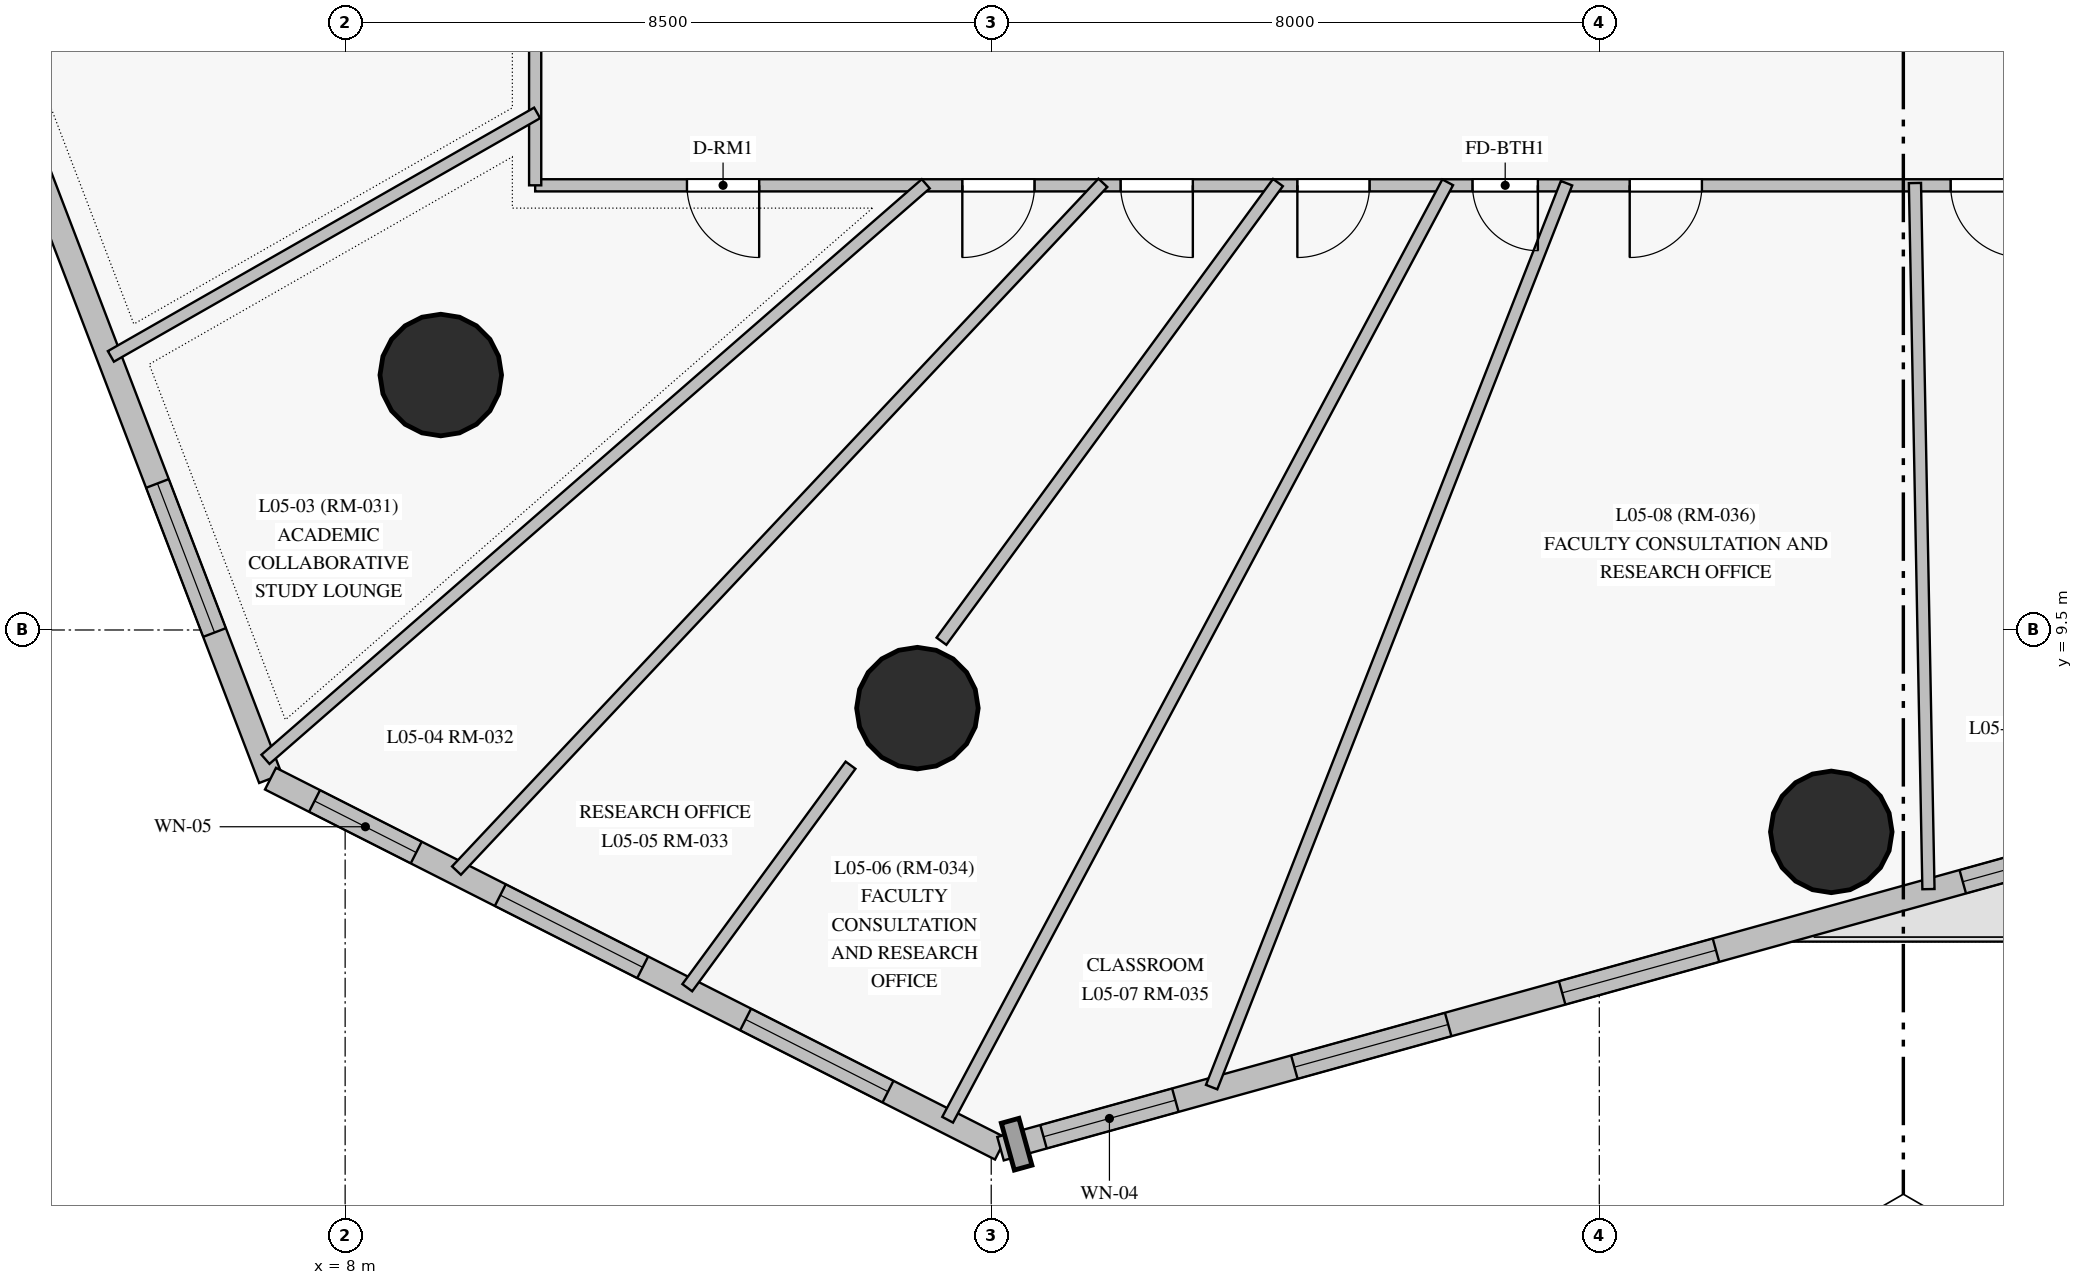
"""IFC4 building model, lengths in metres.
Left out: names, types, materials, properties, quantities, classifications, styles, units other than length and angle.
Written with IfcOpenShell. Run it as: python <this file> out.ifc"""

import sys

from ifc_helpers import new_model, si_unit, direction, frame, frame_2d, origin, origin_with_axes, origin_2d, place, context, subcontext, project, spatial, rectangle, circle, extrude, source, transform, mapped, element, fill, save


model = new_model("IFC4")
c1 = context("Model", 3, precision=1e-05, world=origin(), true_north=direction((0.0, 1.0)))
c2 = subcontext(c1, "Body", "Model", "MODEL_VIEW")
j1 = project(units=[si_unit("LENGTHUNIT", "METRE"), si_unit("PLANEANGLEUNIT", "RADIAN")], contexts=[c1])
p1 = place(None, origin())
s1 = spatial("IfcSite", under=j1, at=p1, CompositionType="ELEMENT")
p2 = place(p1, origin())
s2 = spatial("IfcBuilding", under=s1, at=p2, CompositionType="ELEMENT")
p3 = place(p2, frame((0.0, 0.0, 22.5)))
s3 = spatial("IfcBuildingStorey", under=s2, at=p3, CompositionType="ELEMENT", Elevation=22.5)
m1 = source(origin_with_axes(), c2, "Body", "SweptSolid", [
    extrude(circle(Radius=0.8, at=origin_2d()), origin(), (0.0, 0.0, 1.0), 4.0),
])
for number, where, z_axis, x_axis in (
    (1, (9.258, 12.854, 0.0), (0.0, 0.0, 1.0), (1.0, 0.0, 0.0)),
    (2, (15.529, 8.472, 0.0), (0.0, 0.0, 1.0), (1.0, 0.0, 0.0)),
    (3, (27.552, 6.844, 0.0), (0.0, 0.0, 1.0), (1.0, 0.0, 0.0)),
):
    element("IfcColumn", number, at=place(p3, frame(where, z_axis=z_axis, x_axis=x_axis)), inside=s3, PredefinedType="COLUMN", context=c2, shape_type="MappedRepresentation", body=[
        mapped(m1, transform((0.0, 0.0, 0.0), scale=1.0)),
    ])
p4 = place(p3, frame((2.229, 20.05, 0.0), z_axis=(0.0, 0.0, 1.0), x_axis=(0.357658091535, -0.933852605907, 0.0)))
e4 = element("IfcWall", 4, at=p4, inside=s3, PredefinedType="SOLIDWALL", context=c2, shape_type="SweptSolid", body=[
    extrude(rectangle(XDim=13.391, YDim=0.32, at=frame_2d((6.696, 0.0))), origin(), (0.0, 0.0, 1.0), 3.75),
])
p5 = place(p4, frame((2.704, 0.0, 0.85)))
e5 = element("IfcOpeningElement", 5, at=p5, cuts=e4, PredefinedType="OPENING", context=c2, shape_type="SweptSolid", body=[
    extrude(rectangle(XDim=2.1, YDim=1.95, at=frame_2d((1.05, 0.975))), frame((0.0, 0.17, 0.0), z_axis=(0.0, -1.0, 0.0), x_axis=(1.0, 0.0, 0.0)), (0.0, 0.0, 1.0), 0.34),
])
p6 = place(p4, frame((9.233, 0.0, 0.85)))
e6 = element("IfcOpeningElement", 6, at=p6, cuts=e4, PredefinedType="OPENING", context=c2, shape_type="SweptSolid", body=[
    extrude(rectangle(XDim=2.1, YDim=1.95, at=frame_2d((1.05, 0.975))), frame((0.0, 0.17, 0.0), z_axis=(0.0, -1.0, 0.0), x_axis=(1.0, 0.0, 0.0)), (0.0, 0.0, 1.0), 0.34),
])
p7 = place(p3, frame((7.018, 7.544, 0.0), z_axis=(0.0, 0.0, 1.0), x_axis=(0.891960439123, -0.452113453726, 0.0)))
e7 = element("IfcWall", 7, at=p7, inside=s3, PredefinedType="SOLIDWALL", context=c2, shape_type="SweptSolid", body=[
    extrude(rectangle(XDim=10.768, YDim=0.32, at=frame_2d((5.384, 0.0))), origin(), (0.0, 0.0, 1.0), 3.75),
])
p8 = place(p7, frame((0.649, 0.0, 0.85)))
e8 = element("IfcOpeningElement", 8, at=p8, cuts=e7, PredefinedType="OPENING", context=c2, shape_type="SweptSolid", body=[
    extrude(rectangle(XDim=1.5, YDim=1.85, at=frame_2d((0.75, 0.925))), frame((0.0, 0.17, 0.0), z_axis=(0.0, -1.0, 0.0), x_axis=(1.0, 0.0, 0.0)), (0.0, 0.0, 1.0), 0.34),
])
p9 = place(p7, frame((3.389, 0.0, 0.85)))
e9 = element("IfcOpeningElement", 9, at=p9, cuts=e7, PredefinedType="OPENING", context=c2, shape_type="SweptSolid", body=[
    extrude(rectangle(XDim=2.1, YDim=1.95, at=frame_2d((1.05, 0.975))), frame((0.0, 0.17, 0.0), z_axis=(0.0, -1.0, 0.0), x_axis=(1.0, 0.0, 0.0)), (0.0, 0.0, 1.0), 0.34),
])
p10 = place(p7, frame((7.008, 0.0, 0.85)))
e10 = element("IfcOpeningElement", 10, at=p10, cuts=e7, PredefinedType="OPENING", context=c2, shape_type="SweptSolid", body=[
    extrude(rectangle(XDim=2.1, YDim=1.95, at=frame_2d((1.05, 0.975))), frame((0.0, 0.17, 0.0), z_axis=(0.0, -1.0, 0.0), x_axis=(1.0, 0.0, 0.0)), (0.0, 0.0, 1.0), 0.34),
])
p11 = place(p3, frame((16.622, 2.676, 0.0), z_axis=(0.0, 0.0, 1.0), x_axis=(0.963606446226, 0.267324927367, 0.0)))
e11 = element("IfcWall", 11, at=p11, inside=s3, PredefinedType="SOLIDWALL", context=c2, shape_type="SweptSolid", body=[
    extrude(rectangle(XDim=16.188, YDim=0.32, at=frame_2d((8.094, 0.0))), origin(), (0.0, 0.0, 1.0), 3.75),
])
p12 = place(p11, frame((0.587, 0.0, 0.85)))
e12 = element("IfcOpeningElement", 12, at=p12, cuts=e11, PredefinedType="OPENING", context=c2, shape_type="SweptSolid", body=[
    extrude(rectangle(XDim=1.8, YDim=1.85, at=frame_2d((0.9, 0.925))), frame((0.0, 0.17, 0.0), z_axis=(0.0, -1.0, 0.0), x_axis=(1.0, 0.0, 0.0)), (0.0, 0.0, 1.0), 0.34),
])
p13 = place(p11, frame((4.012, 0.0, 0.85)))
e13 = element("IfcOpeningElement", 13, at=p13, cuts=e11, PredefinedType="OPENING", context=c2, shape_type="SweptSolid", body=[
    extrude(rectangle(XDim=2.1, YDim=1.95, at=frame_2d((1.05, 0.975))), frame((0.0, 0.17, 0.0), z_axis=(0.0, -1.0, 0.0), x_axis=(1.0, 0.0, 0.0)), (0.0, 0.0, 1.0), 0.34),
])
p14 = place(p11, frame((7.668, 0.0, 0.85)))
e14 = element("IfcOpeningElement", 14, at=p14, cuts=e11, PredefinedType="OPENING", context=c2, shape_type="SweptSolid", body=[
    extrude(rectangle(XDim=2.1, YDim=1.95, at=frame_2d((1.05, 0.975))), frame((0.0, 0.17, 0.0), z_axis=(0.0, -1.0, 0.0), x_axis=(1.0, 0.0, 0.0)), (0.0, 0.0, 1.0), 0.34),
])
p15 = place(p11, frame((13.138, 0.0, 0.85)))
e15 = element("IfcOpeningElement", 15, at=p15, cuts=e11, PredefinedType="OPENING", context=c2, shape_type="SweptSolid", body=[
    extrude(rectangle(XDim=2.1, YDim=1.95, at=frame_2d((1.05, 0.975))), frame((0.0, 0.17, 0.0), z_axis=(0.0, -1.0, 0.0), x_axis=(1.0, 0.0, 0.0)), (0.0, 0.0, 1.0), 0.34),
])
p16 = place(p3, frame((40.25, 15.35, 0.0), z_axis=(0.0, 0.0, 1.0), x_axis=(-1.0, 0.0, 0.0)))
e16 = element("IfcWall", 16, at=p16, inside=s3, PredefinedType="PARTITIONING", context=c2, shape_type="SweptSolid", body=[
    extrude(rectangle(XDim=29.75, YDim=0.16, at=frame_2d((14.875, 0.0))), origin(), (0.0, 0.0, 1.0), 3.1),
])
p17 = place(p16, frame((26.803, 0.0, 0.0)))
e17 = element("IfcOpeningElement", 17, at=p17, cuts=e16, PredefinedType="OPENING", context=c2, shape_type="SweptSolid", body=[
    extrude(rectangle(XDim=0.95, YDim=2.15, at=frame_2d((0.475, 1.075))), frame((0.0, 0.09, 0.0), z_axis=(0.0, -1.0, 0.0), x_axis=(1.0, 0.0, 0.0)), (0.0, 0.0, 1.0), 0.18),
])
p18 = place(p16, frame((23.18, 0.0, 0.0)))
e18 = element("IfcOpeningElement", 18, at=p18, cuts=e16, PredefinedType="OPENING", context=c2, shape_type="SweptSolid", body=[
    extrude(rectangle(XDim=0.95, YDim=2.15, at=frame_2d((0.475, 1.075))), frame((0.0, 0.09, 0.0), z_axis=(0.0, -1.0, 0.0), x_axis=(1.0, 0.0, 0.0)), (0.0, 0.0, 1.0), 0.18),
])
p19 = place(p16, frame((21.097, 0.0, 0.0)))
e19 = element("IfcOpeningElement", 19, at=p19, cuts=e16, PredefinedType="OPENING", context=c2, shape_type="SweptSolid", body=[
    extrude(rectangle(XDim=0.95, YDim=2.15, at=frame_2d((0.475, 1.075))), frame((0.0, 0.09, 0.0), z_axis=(0.0, -1.0, 0.0), x_axis=(1.0, 0.0, 0.0)), (0.0, 0.0, 1.0), 0.18),
])
p20 = place(p16, frame((18.772, 0.0, 0.0)))
e20 = element("IfcOpeningElement", 20, at=p20, cuts=e16, PredefinedType="OPENING", context=c2, shape_type="SweptSolid", body=[
    extrude(rectangle(XDim=0.95, YDim=2.15, at=frame_2d((0.475, 1.075))), frame((0.0, 0.09, 0.0), z_axis=(0.0, -1.0, 0.0), x_axis=(1.0, 0.0, 0.0)), (0.0, 0.0, 1.0), 0.18),
])
p21 = place(p16, frame((16.558, 0.0, 0.0)))
e21 = element("IfcOpeningElement", 21, at=p21, cuts=e16, PredefinedType="OPENING", context=c2, shape_type="SweptSolid", body=[
    extrude(rectangle(XDim=0.86, YDim=2.1, at=frame_2d((0.43, 1.05))), frame((0.0, 0.09, 0.0), z_axis=(0.0, -1.0, 0.0), x_axis=(1.0, 0.0, 0.0)), (0.0, 0.0, 1.0), 0.18),
])
p22 = place(p16, frame((14.4, 0.0, 0.0)))
e22 = element("IfcOpeningElement", 22, at=p22, cuts=e16, PredefinedType="OPENING", context=c2, shape_type="SweptSolid", body=[
    extrude(rectangle(XDim=0.95, YDim=2.15, at=frame_2d((0.475, 1.075))), frame((0.0, 0.09, 0.0), z_axis=(0.0, -1.0, 0.0), x_axis=(1.0, 0.0, 0.0)), (0.0, 0.0, 1.0), 0.18),
])
p23 = place(p16, frame((10.177, 0.0, 0.0)))
e23 = element("IfcOpeningElement", 23, at=p23, cuts=e16, PredefinedType="OPENING", context=c2, shape_type="SweptSolid", body=[
    extrude(rectangle(XDim=0.95, YDim=2.15, at=frame_2d((0.475, 1.075))), frame((0.0, 0.09, 0.0), z_axis=(0.0, -1.0, 0.0), x_axis=(1.0, 0.0, 0.0)), (0.0, 0.0, 1.0), 0.18),
])
p24 = place(p16, frame((6.962, 0.0, 0.0)))
e24 = element("IfcOpeningElement", 24, at=p24, cuts=e16, PredefinedType="OPENING", context=c2, shape_type="SweptSolid", body=[
    extrude(rectangle(XDim=0.96, YDim=2.15, at=frame_2d((0.48, 1.075))), frame((0.0, 0.09, 0.0), z_axis=(0.0, -1.0, 0.0), x_axis=(1.0, 0.0, 0.0)), (0.0, 0.0, 1.0), 0.18),
])
p25 = place(p16, frame((1.325, 0.0, 0.0)))
e25 = element("IfcOpeningElement", 25, at=p25, cuts=e16, PredefinedType="OPENING", context=c2, shape_type="SweptSolid", body=[
    extrude(rectangle(XDim=0.95, YDim=2.15, at=frame_2d((0.475, 1.075))), frame((0.0, 0.09, 0.0), z_axis=(0.0, -1.0, 0.0), x_axis=(1.0, 0.0, 0.0)), (0.0, 0.0, 1.0), 0.18),
])
p26 = place(p3, frame((10.5, 15.35, 0.0), z_axis=(0.0, 0.0, 1.0), x_axis=(0.0, 1.0, 0.0)))
e26 = element("IfcWall", 26, at=p26, inside=s3, PredefinedType="PARTITIONING", context=c2, shape_type="SweptSolid", body=[
    extrude(rectangle(XDim=22.3, YDim=0.16, at=frame_2d((11.15, 0.0))), origin(), (0.0, 0.0, 1.0), 3.15),
])
p27 = place(p26, frame((7.33, 0.0, 0.0)))
e27 = element("IfcOpeningElement", 27, at=p27, cuts=e26, PredefinedType="OPENING", context=c2, shape_type="SweptSolid", body=[
    extrude(rectangle(XDim=0.95, YDim=2.15, at=frame_2d((0.475, 1.075))), frame((0.0, 0.09, 0.0), z_axis=(0.0, -1.0, 0.0), x_axis=(1.0, 0.0, 0.0)), (0.0, 0.0, 1.0), 0.18),
])
p28 = place(p26, frame((5.1, 0.0, 0.0)))
e28 = element("IfcOpeningElement", 28, at=p28, cuts=e26, PredefinedType="OPENING", context=c2, shape_type="SweptSolid", body=[
    extrude(rectangle(XDim=0.96, YDim=2.15, at=frame_2d((0.48, 1.075))), frame((0.0, 0.09, 0.0), z_axis=(0.0, -1.0, 0.0), x_axis=(1.0, 0.0, 0.0)), (0.0, 0.0, 1.0), 0.18),
])
p29 = place(p26, frame((16.25, 0.0, 0.0)))
e29 = element("IfcOpeningElement", 29, at=p29, cuts=e26, PredefinedType="OPENING", context=c2, shape_type="SweptSolid", body=[
    extrude(rectangle(XDim=0.95, YDim=2.15, at=frame_2d((0.475, 1.075))), frame((0.0, 0.09, 0.0), z_axis=(0.0, -1.0, 0.0), x_axis=(1.0, 0.0, 0.0)), (0.0, 0.0, 1.0), 0.18),
])
p30 = place(p26, frame((10.675, 0.0, 0.0)))
e30 = element("IfcOpeningElement", 30, at=p30, cuts=e26, PredefinedType="OPENING", context=c2, shape_type="SweptSolid", body=[
    extrude(rectangle(XDim=0.96, YDim=2.15, at=frame_2d((0.48, 1.075))), frame((0.0, 0.09, 0.0), z_axis=(0.0, -1.0, 0.0), x_axis=(1.0, 0.0, 0.0)), (0.0, 0.0, 1.0), 0.18),
])
p31 = place(p3, frame((22.505, 15.39, 0.0), z_axis=(0.0, 0.0, 1.0), x_axis=(-0.470665290854, -0.882311840556, 0.0)))
e31 = element("IfcWall", 31, at=p31, inside=s3, PredefinedType="PARTITIONING", context=c2, shape_type="SweptSolid", body=[
    extrude(rectangle(XDim=13.978, YDim=0.16, at=frame_2d((6.989, 0.0))), origin(), (0.0, 0.0, 1.0), 3.75),
])
p32 = place(p3, frame((24.069, 15.378, 0.0), z_axis=(0.0, 0.0, 1.0), x_axis=(-0.36545902656, -0.930827427564, 0.0)))
e32 = element("IfcWall", 32, at=p32, inside=s3, PredefinedType="PARTITIONING", context=c2, shape_type="SweptSolid", body=[
    extrude(rectangle(XDim=12.776, YDim=0.16, at=frame_2d((6.388, 0.0))), origin(), (0.0, 0.0, 1.0), 3.75),
])
p33 = place(p3, frame((17.969, 15.383, 0.0), z_axis=(0.0, 0.0, 1.0), x_axis=(-0.684864078092, -0.728670841011, 0.0)))
e33 = element("IfcWall", 33, at=p33, inside=s3, PredefinedType="PARTITIONING", context=c2, shape_type="SweptSolid", body=[
    extrude(rectangle(XDim=12.417, YDim=0.16, at=frame_2d((6.208, 0.0))), origin(), (0.0, 0.0, 1.0), 3.1),
])
p34 = place(p3, frame((15.639, 15.37, 0.0), z_axis=(0.0, 0.0, 1.0), x_axis=(-0.753858830781, -0.657036424602, 0.0)))
e34 = element("IfcWall", 34, at=p34, inside=s3, PredefinedType="PARTITIONING", context=c2, shape_type="SweptSolid", body=[
    extrude(rectangle(XDim=11.523, YDim=0.16, at=frame_2d((5.762, 0.0))), origin(), (0.0, 0.0, 1.0), 3.75),
])
p35 = place(p3, frame((28.653, 15.38, 0.0), z_axis=(0.0, 0.0, 1.0), x_axis=(0.019130224358, -0.999817000514, 0.0)))
e35 = element("IfcWall", 35, at=p35, inside=s3, PredefinedType="PARTITIONING", context=c2, shape_type="SweptSolid", body=[
    extrude(rectangle(XDim=9.291, YDim=0.16, at=frame_2d((4.646, 0.0))), origin(), (0.0, 0.0, 1.0), 3.75),
])
p36 = place(p3, frame((20.272, 15.386, 0.0), z_axis=(0.0, 0.0, 1.0), x_axis=(-0.591510737787, -0.806297120845, 0.0)))
e36 = element("IfcWall", 36, at=p36, inside=s3, PredefinedType="PARTITIONING", context=c2, shape_type="SweptSolid", body=[
    extrude(rectangle(XDim=7.484, YDim=0.16, at=frame_2d((3.742, 0.0))), origin(), (0.0, 0.0, 1.0), 3.1),
])
p37 = place(p3, frame((10.526, 16.302, 0.0), z_axis=(0.0, 0.0, 1.0), x_axis=(-0.86834547933, -0.495959805355, 0.0)))
e37 = element("IfcWall", 37, at=p37, inside=s3, PredefinedType="PARTITIONING", context=c2, shape_type="SweptSolid", body=[
    extrude(rectangle(XDim=6.458, YDim=0.16, at=frame_2d((3.229, 0.0))), origin(), (0.0, 0.0, 1.0), 3.75),
])
p38 = place(p3, frame((14.649, 7.721, 0.0), z_axis=(0.0, 0.0, 1.0), x_axis=(-0.59150942177, -0.806298086292, 0.0)))
e38 = element("IfcWall", 38, at=p38, inside=s3, PredefinedType="PARTITIONING", context=c2, shape_type="SweptSolid", body=[
    extrude(rectangle(XDim=3.63, YDim=0.16, at=frame_2d((1.815, 0.0))), origin(), (0.0, 0.0, 1.0), 3.75),
])
m2 = source(origin_with_axes(), c2, "Body", "SweptSolid", [
    extrude(rectangle(XDim=2.1, YDim=1.95, at=frame_2d((1.05, 0.975))), frame((0.0, 0.03, 0.0), z_axis=(0.0, -1.0, 0.0), x_axis=(1.0, 0.0, 0.0)), (0.0, 0.0, 1.0), 0.06),
])
p39 = place(p6, origin())
e39 = element("IfcWindow", 39, at=p39, inside=s3, PartitioningType="SINGLE_PANEL", PredefinedType="WINDOW", context=c2, shape_type="MappedRepresentation", body=[
    mapped(m2, transform((0.0, 0.0, 0.0), scale=1.0)),
])
fill(e6, e39)
m3 = source(origin_with_axes(), c2, "Body", "SweptSolid", [
    extrude(rectangle(XDim=1.5, YDim=1.85, at=frame_2d((0.75, 0.925))), frame((0.0, 0.03, 0.0), z_axis=(0.0, -1.0, 0.0), x_axis=(1.0, 0.0, 0.0)), (0.0, 0.0, 1.0), 0.06),
])
p40 = place(p8, origin())
e40 = element("IfcWindow", 40, at=p40, inside=s3, PartitioningType="SINGLE_PANEL", PredefinedType="WINDOW", context=c2, shape_type="MappedRepresentation", body=[
    mapped(m3, transform((0.0, 0.0, 0.0), scale=1.0)),
])
fill(e8, e40)
p41 = place(p9, origin())
e41 = element("IfcWindow", 41, at=p41, inside=s3, PartitioningType="SINGLE_PANEL", PredefinedType="WINDOW", context=c2, shape_type="MappedRepresentation", body=[
    mapped(m2, transform((0.0, 0.0, 0.0), scale=1.0)),
])
fill(e9, e41)
p42 = place(p10, origin())
e42 = element("IfcWindow", 42, at=p42, inside=s3, PartitioningType="SINGLE_PANEL", PredefinedType="WINDOW", context=c2, shape_type="MappedRepresentation", body=[
    mapped(m2, transform((0.0, 0.0, 0.0), scale=1.0)),
])
fill(e10, e42)
m4 = source(origin_with_axes(), c2, "Body", "SweptSolid", [
    extrude(rectangle(XDim=1.8, YDim=1.85, at=frame_2d((0.9, 0.925))), frame((0.0, 0.03, 0.0), z_axis=(0.0, -1.0, 0.0), x_axis=(1.0, 0.0, 0.0)), (0.0, 0.0, 1.0), 0.06),
])
p43 = place(p12, origin())
e43 = element("IfcWindow", 43, at=p43, inside=s3, PartitioningType="SINGLE_PANEL", PredefinedType="WINDOW", context=c2, shape_type="MappedRepresentation", body=[
    mapped(m4, transform((0.0, 0.0, 0.0), scale=1.0)),
])
fill(e12, e43)
p44 = place(p13, origin())
e44 = element("IfcWindow", 44, at=p44, inside=s3, PartitioningType="SINGLE_PANEL", PredefinedType="WINDOW", context=c2, shape_type="MappedRepresentation", body=[
    mapped(m2, transform((0.0, 0.0, 0.0), scale=1.0)),
])
fill(e13, e44)
p45 = place(p14, origin())
e45 = element("IfcWindow", 45, at=p45, inside=s3, PartitioningType="SINGLE_PANEL", PredefinedType="WINDOW", context=c2, shape_type="MappedRepresentation", body=[
    mapped(m2, transform((0.0, 0.0, 0.0), scale=1.0)),
])
fill(e14, e45)
p46 = place(p15, origin())
e46 = element("IfcWindow", 46, at=p46, inside=s3, PartitioningType="SINGLE_PANEL", PredefinedType="WINDOW", context=c2, shape_type="MappedRepresentation", body=[
    mapped(m2, transform((0.0, 0.0, 0.0), scale=1.0)),
])
fill(e15, e46)
m5 = source(origin_with_axes(), c2, "Body", "SweptSolid", [
    extrude(rectangle(XDim=0.95, YDim=2.15, at=frame_2d((0.475, 1.075))), frame((0.0, 0.025, 0.0), z_axis=(0.0, -1.0, 0.0), x_axis=(1.0, 0.0, 0.0)), (0.0, 0.0, 1.0), 0.05),
])
p47 = place(p17, origin())
e47 = element("IfcDoor", 47, at=p47, inside=s3, OperationType="SINGLE_SWING_LEFT", PredefinedType="DOOR", context=c2, shape_type="MappedRepresentation", body=[
    mapped(m5, transform((0.0, 0.0, 0.0), scale=1.0)),
])
fill(e17, e47)
p48 = place(p18, origin())
e48 = element("IfcDoor", 48, at=p48, inside=s3, OperationType="SINGLE_SWING_RIGHT", PredefinedType="DOOR", context=c2, shape_type="MappedRepresentation", body=[
    mapped(m5, transform((0.0, 0.0, 0.0), scale=1.0)),
])
fill(e18, e48)
p49 = place(p19, origin())
e49 = element("IfcDoor", 49, at=p49, inside=s3, OperationType="SINGLE_SWING_LEFT", PredefinedType="DOOR", context=c2, shape_type="MappedRepresentation", body=[
    mapped(m5, transform((0.0, 0.0, 0.0), scale=1.0)),
])
fill(e19, e49)
p50 = place(p20, origin())
e50 = element("IfcDoor", 50, at=p50, inside=s3, OperationType="SINGLE_SWING_RIGHT", PredefinedType="DOOR", context=c2, shape_type="MappedRepresentation", body=[
    mapped(m5, transform((0.0, 0.0, 0.0), scale=1.0)),
])
fill(e20, e50)
m6 = source(origin_with_axes(), c2, "Body", "SweptSolid", [
    extrude(rectangle(XDim=0.86, YDim=2.1, at=frame_2d((0.43, 1.05))), frame((0.0, 0.025, 0.0), z_axis=(0.0, -1.0, 0.0), x_axis=(1.0, 0.0, 0.0)), (0.0, 0.0, 1.0), 0.05),
])
p51 = place(p21, origin())
e51 = element("IfcDoor", 51, at=p51, inside=s3, OperationType="SINGLE_SWING_LEFT", PredefinedType="DOOR", context=c2, shape_type="MappedRepresentation", body=[
    mapped(m6, transform((0.0, 0.0, 0.0), scale=1.0)),
])
fill(e21, e51)
p52 = place(p22, origin())
e52 = element("IfcDoor", 52, at=p52, inside=s3, OperationType="SINGLE_SWING_RIGHT", PredefinedType="DOOR", context=c2, shape_type="MappedRepresentation", body=[
    mapped(m5, transform((0.0, 0.0, 0.0), scale=1.0)),
])
fill(e22, e52)
p53 = place(p23, origin())
e53 = element("IfcDoor", 53, at=p53, inside=s3, OperationType="SINGLE_SWING_LEFT", PredefinedType="DOOR", context=c2, shape_type="MappedRepresentation", body=[
    mapped(m5, transform((0.0, 0.0, 0.0), scale=1.0)),
])
fill(e23, e53)
save(model, sys.argv[1])
